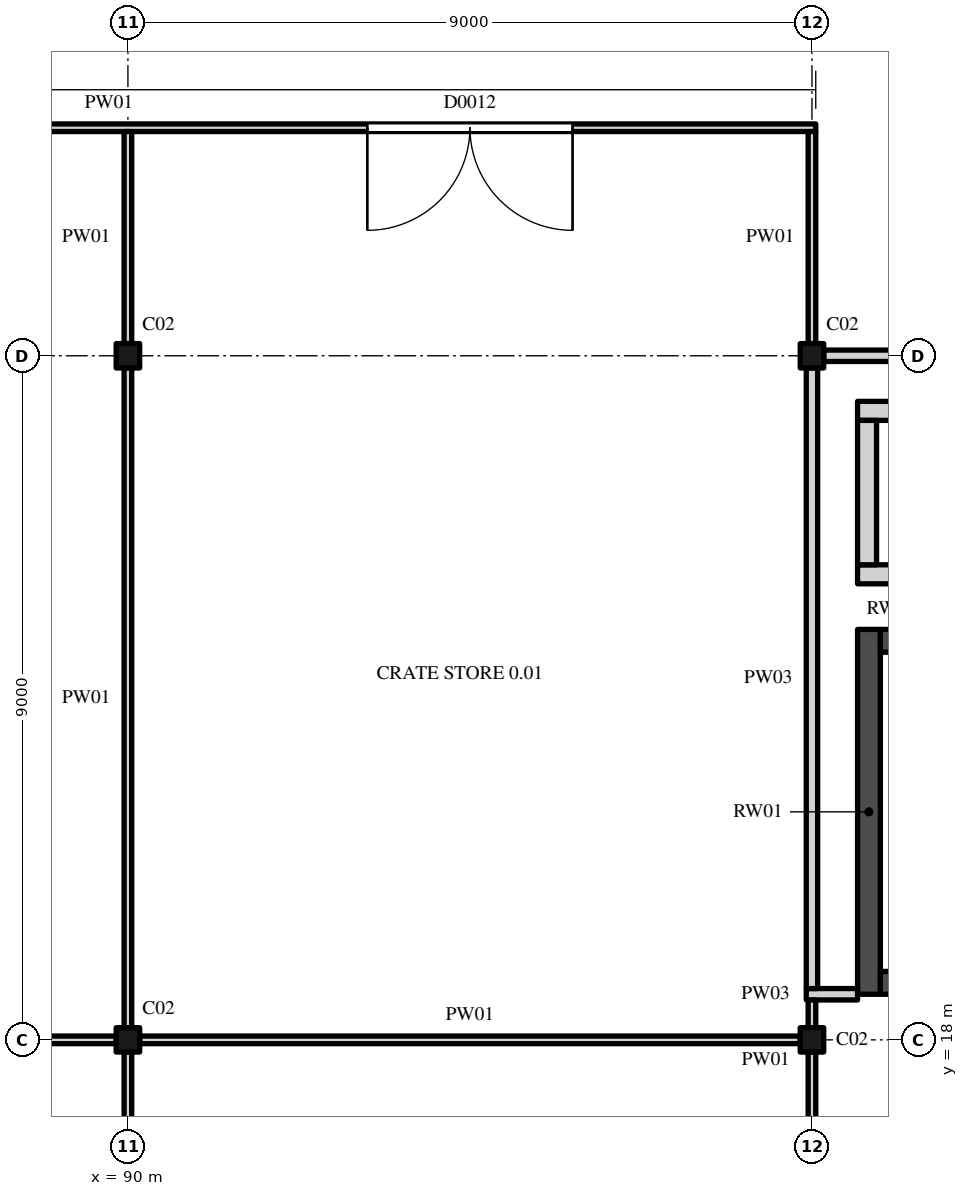
"""IFC4 building model, lengths in metres.
Left out: names, types, materials, properties, quantities, classifications, styles, units other than length and angle.
Written with IfcOpenShell. Run it as: python <this file> out.ifc"""

import sys

from ifc_helpers import new_model, si_unit, direction, frame, frame_2d, origin, origin_2d, place, context, subcontext, project, spatial, rectangle, i_section, extrude, element, fill, save


model = new_model("IFC4")
c1 = context("Model", 3, precision=1e-05, world=origin(), true_north=direction((0.0, 1.0)))
c2 = subcontext(c1, "Body", "Model", "MODEL_VIEW")
j1 = project(units=[si_unit("LENGTHUNIT", "METRE"), si_unit("PLANEANGLEUNIT", "RADIAN")], contexts=[c1])
p1 = place(None, origin())
s1 = spatial("IfcSite", under=j1, at=p1, CompositionType="ELEMENT")
p2 = place(p1, origin())
s2 = spatial("IfcBuilding", under=s1, at=p2, CompositionType="ELEMENT")
p3 = place(p2, origin())
s3 = spatial("IfcBuildingStorey", under=s2, at=p3, CompositionType="ELEMENT", Elevation=0.0)
for number, where, z_axis, x_axis in (
    (1, (90.0, 18.0, 0.0), (0.0, 0.0, 1.0), (1.0, 0.0, 0.0)),
    (2, (99.0, 18.0, 0.0), (0.0, 0.0, 1.0), (1.0, 0.0, 0.0)),
    (3, (90.0, 27.0, 0.0), (0.0, 0.0, 1.0), (1.0, 0.0, 0.0)),
    (4, (99.0, 27.0, 0.0), (0.0, 0.0, 1.0), (1.0, 0.0, 0.0)),
):
    element("IfcColumn", number, at=place(p3, frame(where, z_axis=z_axis, x_axis=x_axis)), inside=s3, PredefinedType="COLUMN", context=c2, shape_type="SweptSolid", body=[
        extrude(i_section(OverallWidth=0.309, OverallDepth=0.321, WebThickness=0.014, FlangeThickness=0.022, FilletRadius=0.017, at=origin_2d()), origin(), (0.0, 0.0, 1.0), 6.0),
    ])
p4 = place(p3, frame((99.75, 18.6, -1.5), z_axis=(0.0, 0.0, 1.0), x_axis=(0.0, 1.0, 0.0)))
e5 = element("IfcWall", 5, at=p4, inside=s3, PredefinedType="SHEAR", context=c2, shape_type="SweptSolid", body=[
    extrude(rectangle(XDim=4.8, YDim=0.3, at=frame_2d((2.4, 0.0))), origin(), (0.0, 0.0, 1.0), 7.5),
])
p5 = place(p3, frame((99.9, 18.75, -1.5), z_axis=(0.0, 0.0, 1.0), x_axis=(1.0, 0.0, 0.0)))
e6 = element("IfcWall", 6, at=p5, inside=s3, PredefinedType="SHEAR", context=c2, shape_type="SweptSolid", body=[
    extrude(rectangle(XDim=3.45, YDim=0.3, at=frame_2d((1.725, 0.0))), origin(), (0.0, 0.0, 1.0), 7.5),
])
p6 = place(p5, frame((0.6, 0.0, 1.5)))
e7 = element("IfcOpeningElement", 7, at=p6, cuts=e6, PredefinedType="OPENING", context=c2, shape_type="SweptSolid", body=[
    extrude(rectangle(XDim=2.1, YDim=2.4, at=frame_2d((1.05, 1.2))), frame((0.0, 0.16, 0.0), z_axis=(0.0, -1.0, 0.0), x_axis=(1.0, 0.0, 0.0)), (0.0, 0.0, 1.0), 0.32),
])
p7 = place(p3, frame((99.9, 23.25, -1.5), z_axis=(0.0, 0.0, 1.0), x_axis=(1.0, 0.0, 0.0)))
e8 = element("IfcWall", 8, at=p7, inside=s3, PredefinedType="SHEAR", context=c2, shape_type="SweptSolid", body=[
    extrude(rectangle(XDim=3.45, YDim=0.3, at=frame_2d((1.725, 0.0))), origin(), (0.0, 0.0, 1.0), 7.5),
])
for number, where, z_axis, x_axis in (
    (9, (99.6, 24.125, 0.0), (0.0, 0.0, 1.0), (1.0, 0.0, 0.0)),
    (10, (99.6, 26.275, 0.0), (0.0, 0.0, 1.0), (1.0, 0.0, 0.0)),
):
    element("IfcWall", number, at=place(p3, frame(where, z_axis=z_axis, x_axis=x_axis)), inside=s3, PredefinedType="STANDARD", context=c2, shape_type="SweptSolid", body=[
        extrude(rectangle(XDim=1.8, YDim=0.25, at=frame_2d((0.9, 0.0))), origin(), (0.0, 0.0, 1.0), 6.0),
    ])
p8 = place(p3, frame((99.725, 24.25, 0.0), z_axis=(0.0, 0.0, 1.0), x_axis=(0.0, 1.0, 0.0)))
e11 = element("IfcWall", 11, at=p8, inside=s3, PredefinedType="STANDARD", context=c2, shape_type="SweptSolid", body=[
    extrude(rectangle(XDim=1.9, YDim=0.25, at=frame_2d((0.95, 0.0))), origin(), (0.0, 0.0, 1.0), 6.0),
])
for number, where, z_axis, x_axis in (
    (12, (81.155, 18.0, 0.0), (0.0, 0.0, 1.0), (1.0, 0.0, 0.0)),
    (13, (90.155, 18.0, 0.0), (0.0, 0.0, 1.0), (1.0, 0.0, 0.0)),
):
    element("IfcWall", number, at=place(p3, frame(where, z_axis=z_axis, x_axis=x_axis)), inside=s3, PredefinedType="PARTITIONING", context=c2, shape_type="SweptSolid", body=[
        extrude(rectangle(XDim=8.691, YDim=0.1, at=frame_2d((4.345, 0.0))), origin(), (0.0, 0.0, 1.0), 5.419),
    ])
p9 = place(p3, frame((98.925, 18.6, 0.0), z_axis=(0.0, 0.0, 1.0), x_axis=(1.0, 0.0, 0.0)))
e14 = element("IfcWall", 14, at=p9, inside=s3, PredefinedType="PARTITIONING", context=c2, shape_type="SweptSolid", body=[
    extrude(rectangle(XDim=0.675, YDim=0.15, at=frame_2d((0.337, 0.0))), origin(), (0.0, 0.0, 1.0), 5.825),
])
p10 = place(p3, frame((99.155, 27.0, 0.0), z_axis=(0.0, 0.0, 1.0), x_axis=(1.0, 0.0, 0.0)))
e15 = element("IfcWall", 15, at=p10, inside=s3, PredefinedType="PARTITIONING", context=c2, shape_type="SweptSolid", body=[
    extrude(rectangle(XDim=8.691, YDim=0.15, at=frame_2d((4.345, 0.0))), origin(), (0.0, 0.0, 1.0), 5.419),
])
p11 = place(p10, frame((3.75, 0.0, 0.0)))
e16 = element("IfcOpeningElement", 16, at=p11, cuts=e15, PredefinedType="OPENING", context=c2, shape_type="SweptSolid", body=[
    extrude(rectangle(XDim=1.2, YDim=2.4, at=frame_2d((0.6, 1.2))), frame((0.0, 0.085, 0.0), z_axis=(0.0, -1.0, 0.0), x_axis=(1.0, 0.0, 0.0)), (0.0, 0.0, 1.0), 0.17),
])
p12 = place(p3, frame((62.4, 30.0, 0.0), z_axis=(0.0, 0.0, 1.0), x_axis=(1.0, 0.0, 0.0)))
e17 = element("IfcWall", 17, at=p12, inside=s3, PredefinedType="PARTITIONING", context=c2, shape_type="SweptSolid", body=[
    extrude(rectangle(XDim=36.65, YDim=0.1, at=frame_2d((18.325, 0.0))), origin(), (0.0, 0.0, 1.0), 5.422),
])
p13 = place(p12, frame((3.95, 0.0, 0.0)))
e18 = element("IfcOpeningElement", 18, at=p13, cuts=e17, PredefinedType="OPENING", context=c2, shape_type="SweptSolid", body=[
    extrude(rectangle(XDim=2.4, YDim=3.0, at=frame_2d((1.2, 1.5))), frame((0.0, 0.06, 0.0), z_axis=(0.0, -1.0, 0.0), x_axis=(1.0, 0.0, 0.0)), (0.0, 0.0, 1.0), 0.12),
])
p14 = place(p12, frame((13.15, 0.0, 0.0)))
e19 = element("IfcOpeningElement", 19, at=p14, cuts=e17, PredefinedType="OPENING", context=c2, shape_type="SweptSolid", body=[
    extrude(rectangle(XDim=1.8, YDim=2.4, at=frame_2d((0.9, 1.2))), frame((0.0, 0.06, 0.0), z_axis=(0.0, -1.0, 0.0), x_axis=(1.0, 0.0, 0.0)), (0.0, 0.0, 1.0), 0.12),
])
p15 = place(p12, frame((22.15, 0.0, 0.0)))
e20 = element("IfcOpeningElement", 20, at=p15, cuts=e17, PredefinedType="OPENING", context=c2, shape_type="SweptSolid", body=[
    extrude(rectangle(XDim=1.8, YDim=2.4, at=frame_2d((0.9, 1.2))), frame((0.0, 0.06, 0.0), z_axis=(0.0, -1.0, 0.0), x_axis=(1.0, 0.0, 0.0)), (0.0, 0.0, 1.0), 0.12),
])
p16 = place(p12, frame((30.75, 0.0, 0.0)))
e21 = element("IfcOpeningElement", 21, at=p16, cuts=e17, PredefinedType="OPENING", context=c2, shape_type="SweptSolid", body=[
    extrude(rectangle(XDim=2.7, YDim=3.0, at=frame_2d((1.35, 1.5))), frame((0.0, 0.06, 0.0), z_axis=(0.0, -1.0, 0.0), x_axis=(1.0, 0.0, 0.0)), (0.0, 0.0, 1.0), 0.12),
])
for number, where, z_axis, x_axis in (
    (22, (90.0, 9.16, 0.0), (0.0, 0.0, 1.0), (0.0, 1.0, 0.0)),
    (23, (90.0, 18.16, 0.0), (0.0, 0.0, 1.0), (0.0, 1.0, 0.0)),
):
    element("IfcWall", number, at=place(p3, frame(where, z_axis=z_axis, x_axis=x_axis)), inside=s3, PredefinedType="PARTITIONING", context=c2, shape_type="SweptSolid", body=[
        extrude(rectangle(XDim=8.679, YDim=0.1, at=frame_2d((4.34, 0.0))), origin(), (0.0, 0.0, 1.0), 5.292),
    ])
p17 = place(p3, frame((90.0, 27.16, 0.0), z_axis=(0.0, 0.0, 1.0), x_axis=(0.0, 1.0, 0.0)))
e24 = element("IfcWall", 24, at=p17, inside=s3, PredefinedType="PARTITIONING", context=c2, shape_type="SweptSolid", body=[
    extrude(rectangle(XDim=2.79, YDim=0.1, at=frame_2d((1.395, 0.0))), origin(), (0.0, 0.0, 1.0), 5.292),
])
p18 = place(p3, frame((99.0, 9.16, 0.0), z_axis=(0.0, 0.0, 1.0), x_axis=(0.0, 1.0, 0.0)))
e25 = element("IfcWall", 25, at=p18, inside=s3, PredefinedType="PARTITIONING", context=c2, shape_type="SweptSolid", body=[
    extrude(rectangle(XDim=8.679, YDim=0.1, at=frame_2d((4.34, 0.0))), origin(), (0.0, 0.0, 1.0), 5.292),
])
p19 = place(p18, frame((3.55, 0.0, 0.0)))
e26 = element("IfcOpeningElement", 26, at=p19, cuts=e25, PredefinedType="OPENING", context=c2, shape_type="SweptSolid", body=[
    extrude(rectangle(XDim=1.5, YDim=2.1, at=frame_2d((0.75, 1.05))), frame((0.0, 0.06, 0.0), z_axis=(0.0, -1.0, 0.0), x_axis=(1.0, 0.0, 0.0)), (0.0, 0.0, 1.0), 0.12),
])
p20 = place(p3, frame((99.0, 18.16, 0.0), z_axis=(0.0, 0.0, 1.0), x_axis=(0.0, 1.0, 0.0)))
e27 = element("IfcWall", 27, at=p20, inside=s3, PredefinedType="PARTITIONING", context=c2, shape_type="SweptSolid", body=[
    extrude(rectangle(XDim=0.365, YDim=0.1, at=frame_2d((0.182, 0.0))), origin(), (0.0, 0.0, 1.0), 5.825),
])
p21 = place(p3, frame((99.0, 18.675, 0.0), z_axis=(0.0, 0.0, 1.0), x_axis=(0.0, 1.0, 0.0)))
e28 = element("IfcWall", 28, at=p21, inside=s3, PredefinedType="PARTITIONING", context=c2, shape_type="SweptSolid", body=[
    extrude(rectangle(XDim=8.165, YDim=0.15, at=frame_2d((4.082, 0.0))), origin(), (0.0, 0.0, 1.0), 5.292),
])
p22 = place(p3, frame((99.0, 27.16, 0.0), z_axis=(0.0, 0.0, 1.0), x_axis=(0.0, 1.0, 0.0)))
e29 = element("IfcWall", 29, at=p22, inside=s3, PredefinedType="PARTITIONING", context=c2, shape_type="SweptSolid", body=[
    extrude(rectangle(XDim=2.79, YDim=0.1, at=frame_2d((1.395, 0.0))), origin(), (0.0, 0.0, 1.0), 5.292),
])
p23 = place(p16, origin())
e30 = element("IfcDoor", 30, at=p23, inside=s3, OperationType="DOUBLE_DOOR_SINGLE_SWING", PredefinedType="DOOR", context=c2, shape_type="SweptSolid", body=[
    extrude(rectangle(XDim=2.7, YDim=3.0, at=frame_2d((1.35, 1.5))), frame((0.0, 0.025, 0.0), z_axis=(0.0, -1.0, 0.0), x_axis=(1.0, 0.0, 0.0)), (0.0, 0.0, 1.0), 0.05),
])
fill(e21, e30)
save(model, sys.argv[1])
